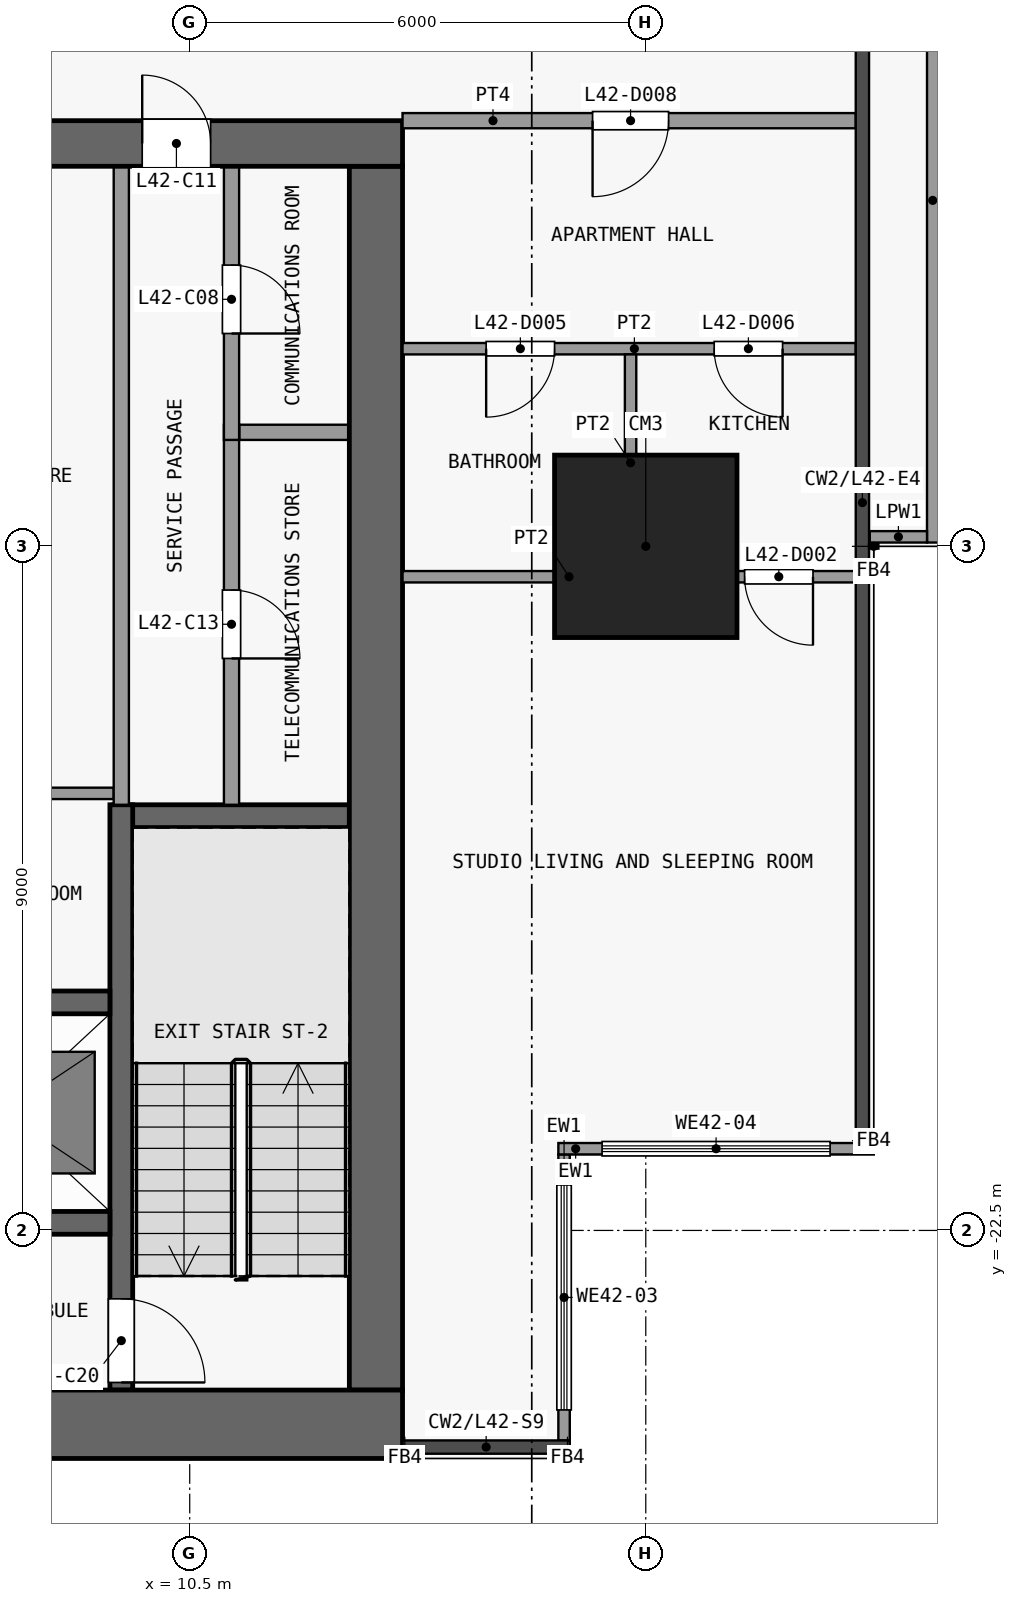
"""IFC4 building model, lengths in metres.
Left out: names, types, materials, properties, quantities, classifications, styles, units other than length and angle.
Written with IfcOpenShell. Run it as: python <this file> out.ifc"""

import sys

from ifc_helpers import new_model, si_unit, direction, frame, frame_2d, origin, origin_2d, place, context, subcontext, project, spatial, rectangle, extrude, element, fill, save


model = new_model("IFC4")
c1 = context("Model", 3, precision=1e-05, world=origin(), true_north=direction((0.0, 1.0)))
c2 = subcontext(c1, "Body", "Model", "MODEL_VIEW")
j1 = project(units=[si_unit("LENGTHUNIT", "METRE"), si_unit("PLANEANGLEUNIT", "RADIAN")], contexts=[c1])
p1 = place(None, origin())
s1 = spatial("IfcSite", under=j1, at=p1, CompositionType="ELEMENT")
p2 = place(p1, origin())
s2 = spatial("IfcBuilding", under=s1, at=p2, CompositionType="ELEMENT")
p3 = place(p2, frame((0.0, 0.0, 170.9)))
s3 = spatial("IfcBuildingStorey", under=s2, at=p3, CompositionType="ELEMENT", Elevation=170.9)
p4 = place(p3, frame((16.5, -13.5, 0.0), z_axis=(0.0, 0.0, 1.0), x_axis=(1.0, 0.0, 0.0)))
e1 = element("IfcColumn", 1, at=p4, inside=s3, PredefinedType="COLUMN", context=c2, shape_type="SweptSolid", body=[
    extrude(rectangle(XDim=2.4, YDim=2.4, at=origin_2d()), origin(), (0.0, 0.0, 1.0), 3.6),
])
p5 = place(p3, frame((-13.3, -25.05, 0.0), z_axis=(0.0, 0.0, 1.0), x_axis=(1.0, 0.0, 0.0)))
e2 = element("IfcWall", 2, at=p5, inside=s3, PredefinedType="SHEAR", context=c2, shape_type="SweptSolid", body=[
    extrude(rectangle(XDim=26.6, YDim=0.9, at=frame_2d((13.3, 0.0))), origin(), (0.0, 0.0, 1.0), 3.3),
])
p6 = place(p3, frame((-13.3, -8.2, 0.0), z_axis=(0.0, 0.0, 1.0), x_axis=(1.0, 0.0, 0.0)))
e3 = element("IfcWall", 3, at=p6, inside=s3, PredefinedType="SHEAR", context=c2, shape_type="SweptSolid", body=[
    extrude(rectangle(XDim=26.6, YDim=0.6, at=frame_2d((13.3, 0.0))), origin(), (0.0, 0.0, 1.0), 3.3),
])
p7 = place(p6, frame((7.6, 0.0, 0.0)))
e4 = element("IfcOpeningElement", 4, at=p7, cuts=e3, PredefinedType="OPENING", context=c2, shape_type="SweptSolid", body=[
    extrude(rectangle(XDim=1.8, YDim=2.1, at=frame_2d((0.9, 1.05))), frame((0.0, 0.31, 0.0), z_axis=(0.0, -1.0, 0.0), x_axis=(1.0, 0.0, 0.0)), (0.0, 0.0, 1.0), 0.62),
])
p8 = place(p6, frame((17.2, 0.0, 0.0)))
e5 = element("IfcOpeningElement", 5, at=p8, cuts=e3, PredefinedType="OPENING", context=c2, shape_type="SweptSolid", body=[
    extrude(rectangle(XDim=1.8, YDim=2.1, at=frame_2d((0.9, 1.05))), frame((0.0, 0.31, 0.0), z_axis=(0.0, -1.0, 0.0), x_axis=(1.0, 0.0, 0.0)), (0.0, 0.0, 1.0), 0.62),
])
p9 = place(p6, frame((2.525, 0.0, 0.0)))
e6 = element("IfcOpeningElement", 6, at=p9, cuts=e3, PredefinedType="OPENING", context=c2, shape_type="SweptSolid", body=[
    extrude(rectangle(XDim=0.9, YDim=2.1, at=frame_2d((0.45, 1.05))), frame((0.0, 0.31, 0.0), z_axis=(0.0, -1.0, 0.0), x_axis=(1.0, 0.0, 0.0)), (0.0, 0.0, 1.0), 0.62),
])
p10 = place(p6, frame((23.175, 0.0, 0.0)))
e7 = element("IfcOpeningElement", 7, at=p10, cuts=e3, PredefinedType="OPENING", context=c2, shape_type="SweptSolid", body=[
    extrude(rectangle(XDim=0.9, YDim=2.1, at=frame_2d((0.45, 1.05))), frame((0.0, 0.31, 0.0), z_axis=(0.0, -1.0, 0.0), x_axis=(1.0, 0.0, 0.0)), (0.0, 0.0, 1.0), 0.62),
])
p11 = place(p3, frame((12.95, -24.6, 0.0), z_axis=(0.0, 0.0, 1.0), x_axis=(0.0, 1.0, 0.0)))
e8 = element("IfcWall", 8, at=p11, inside=s3, PredefinedType="SHEAR", context=c2, shape_type="SweptSolid", body=[
    extrude(rectangle(XDim=16.1, YDim=0.7, at=frame_2d((8.05, 0.0))), origin(), (0.0, 0.0, 1.0), 3.3),
])
p12 = place(p3, frame((6.35, -22.4, 0.0), z_axis=(0.0, 0.0, 1.0), x_axis=(1.0, 0.0, 0.0)))
e9 = element("IfcWall", 9, at=p12, inside=s3, PredefinedType="SHEAR", context=c2, shape_type="SweptSolid", body=[
    extrude(rectangle(XDim=3.1, YDim=0.3, at=frame_2d((1.55, 0.0))), origin(), (0.0, 0.0, 1.0), 3.3),
])
p13 = place(p3, frame((6.425, -19.5, 0.0), z_axis=(0.0, 0.0, 1.0), x_axis=(1.0, 0.0, 0.0)))
e10 = element("IfcWall", 10, at=p13, inside=s3, PredefinedType="SHEAR", context=c2, shape_type="SweptSolid", body=[
    extrude(rectangle(XDim=3.025, YDim=0.3, at=frame_2d((1.512, 0.0))), origin(), (0.0, 0.0, 1.0), 3.3),
])
p14 = place(p3, frame((9.5, -17.05, 0.0), z_axis=(0.0, 0.0, 1.0), x_axis=(1.0, 0.0, 0.0)))
e11 = element("IfcWall", 11, at=p14, inside=s3, PredefinedType="SHEAR", context=c2, shape_type="SweptSolid", body=[
    extrude(rectangle(XDim=3.1, YDim=0.3, at=frame_2d((1.55, 0.0))), origin(), (0.0, 0.0, 1.0), 3.3),
])
p15 = place(p3, frame((6.575, -16.75, 0.0), z_axis=(0.0, 0.0, 1.0), x_axis=(1.0, 0.0, 0.0)))
e12 = element("IfcWall", 12, at=p15, inside=s3, PredefinedType="PARTITIONING", context=c2, shape_type="SweptSolid", body=[
    extrude(rectangle(XDim=2.925, YDim=0.15, at=frame_2d((1.462, 0.0))), origin(), (0.0, 0.0, 1.0), 3.3),
])
p16 = place(p3, frame((11.15, -12.0, 0.0), z_axis=(0.0, 0.0, 1.0), x_axis=(1.0, 0.0, 0.0)))
e13 = element("IfcWall", 13, at=p16, inside=s3, PredefinedType="PARTITIONING", context=c2, shape_type="SweptSolid", body=[
    extrude(rectangle(XDim=1.45, YDim=0.2, at=frame_2d((0.725, 0.0))), origin(), (0.0, 0.0, 1.0), 3.3),
])
p17 = place(p3, frame((9.6, -16.9, 0.0), z_axis=(0.0, 0.0, 1.0), x_axis=(0.0, -1.0, 0.0)))
e14 = element("IfcWall", 14, at=p17, inside=s3, PredefinedType="SHEAR", context=c2, shape_type="SweptSolid", body=[
    extrude(rectangle(XDim=7.7, YDim=0.3, at=frame_2d((3.85, 0.0))), origin(), (0.0, 0.0, 1.0), 3.3),
])
p18 = place(p17, frame((6.5, 0.0, 0.0)))
e15 = element("IfcOpeningElement", 15, at=p18, cuts=e14, PredefinedType="OPENING", context=c2, shape_type="SweptSolid", body=[
    extrude(rectangle(XDim=1.1, YDim=2.1, at=frame_2d((0.55, 1.05))), frame((0.0, 0.16, 0.0), z_axis=(0.0, -1.0, 0.0), x_axis=(1.0, 0.0, 0.0)), (0.0, 0.0, 1.0), 0.32),
])
p19 = place(p3, frame((9.6, -16.9, 0.0), z_axis=(0.0, 0.0, 1.0), x_axis=(0.0, 1.0, 0.0)))
e16 = element("IfcWall", 16, at=p19, inside=s3, PredefinedType="PARTITIONING", context=c2, shape_type="SweptSolid", body=[
    extrude(rectangle(XDim=8.4, YDim=0.2, at=frame_2d((4.2, 0.0))), origin(), (0.0, 0.0, 1.0), 3.3),
])
p20 = place(p3, frame((11.05, -11.9, 0.0), z_axis=(0.0, 0.0, 1.0), x_axis=(0.0, -1.0, 0.0)))
e17 = element("IfcWall", 17, at=p20, inside=s3, PredefinedType="PARTITIONING", context=c2, shape_type="SweptSolid", body=[
    extrude(rectangle(XDim=5.0, YDim=0.2, at=frame_2d((2.5, 0.0))), origin(), (0.0, 0.0, 1.0), 3.3),
])
p21 = place(p20, frame((2.175, 0.0, 0.0)))
e18 = element("IfcOpeningElement", 18, at=p21, cuts=e17, PredefinedType="OPENING", context=c2, shape_type="SweptSolid", body=[
    extrude(rectangle(XDim=0.9, YDim=2.1, at=frame_2d((0.45, 1.05))), frame((0.0, 0.11, 0.0), z_axis=(0.0, -1.0, 0.0), x_axis=(1.0, 0.0, 0.0)), (0.0, 0.0, 1.0), 0.22),
])
p22 = place(p3, frame((11.05, -8.5, 0.0), z_axis=(0.0, 0.0, 1.0), x_axis=(0.0, -1.0, 0.0)))
e19 = element("IfcWall", 19, at=p22, inside=s3, PredefinedType="PARTITIONING", context=c2, shape_type="SweptSolid", body=[
    extrude(rectangle(XDim=3.6, YDim=0.2, at=frame_2d((1.8, 0.0))), origin(), (0.0, 0.0, 1.0), 3.3),
])
p23 = place(p22, frame((1.3, 0.0, 0.0)))
e20 = element("IfcOpeningElement", 20, at=p23, cuts=e19, PredefinedType="OPENING", context=c2, shape_type="SweptSolid", body=[
    extrude(rectangle(XDim=0.9, YDim=2.1, at=frame_2d((0.45, 1.05))), frame((0.0, 0.11, 0.0), z_axis=(0.0, -1.0, 0.0), x_axis=(1.0, 0.0, 0.0)), (0.0, 0.0, 1.0), 0.22),
])
p24 = place(p3, frame((15.425, -21.5, 0.0), z_axis=(0.0, 0.0, 1.0), x_axis=(0.0, -1.0, 0.0)))
e21 = element("IfcWall", 21, at=p24, inside=s3, PredefinedType="SOLIDWALL", context=c2, shape_type="SweptSolid", body=[
    extrude(rectangle(XDim=3.762, YDim=0.15, at=frame_2d((1.881, 0.0))), origin(), (0.0, 0.0, 1.0), 3.3),
])
p25 = place(p24, frame((0.401, 0.0, 0.9)))
e22 = element("IfcOpeningElement", 22, at=p25, cuts=e21, PredefinedType="OPENING", context=c2, shape_type="SweptSolid", body=[
    extrude(rectangle(XDim=2.96, YDim=2.4, at=frame_2d((1.48, 1.2))), frame((0.0, 0.085, 0.0), z_axis=(0.0, -1.0, 0.0), x_axis=(1.0, 0.0, 0.0)), (0.0, 0.0, 1.0), 0.17),
])
p26 = place(p3, frame((19.5, -21.425, 0.0), z_axis=(0.0, 0.0, 1.0), x_axis=(-1.0, 0.0, 0.0)))
e23 = element("IfcWall", 23, at=p26, inside=s3, PredefinedType="SOLIDWALL", context=c2, shape_type="SweptSolid", body=[
    extrude(rectangle(XDim=4.15, YDim=0.15, at=frame_2d((2.075, 0.0))), origin(), (0.0, 0.0, 1.0), 3.3),
])
p27 = place(p26, frame((0.575, 0.0, 0.9)))
e24 = element("IfcOpeningElement", 24, at=p27, cuts=e23, PredefinedType="OPENING", context=c2, shape_type="SweptSolid", body=[
    extrude(rectangle(XDim=3.0, YDim=2.4, at=frame_2d((1.5, 1.2))), frame((0.0, 0.085, 0.0), z_axis=(0.0, -1.0, 0.0), x_axis=(1.0, 0.0, 0.0)), (0.0, 0.0, 1.0), 0.17),
])
p28 = place(p3, frame((20.275, -4.448, 0.0), z_axis=(0.0, 0.0, 1.0), x_axis=(0.0, -1.0, 0.0)))
e25 = element("IfcWall", 25, at=p28, inside=s3, PredefinedType="PARAPET", context=c2, shape_type="SweptSolid", body=[
    extrude(rectangle(XDim=9.002, YDim=0.15, at=frame_2d((4.501, 0.0))), origin(), (0.0, 0.0, 1.0), 1.15),
])
p29 = place(p3, frame((20.2, -13.375, 0.0), z_axis=(0.0, 0.0, 1.0), x_axis=(-1.0, 0.0, 0.0)))
e26 = element("IfcWall", 26, at=p29, inside=s3, PredefinedType="PARAPET", context=c2, shape_type="SweptSolid", body=[
    extrude(rectangle(XDim=0.752, YDim=0.15, at=frame_2d((0.376, 0.0))), origin(), (0.0, 0.0, 1.0), 1.15),
])
p30 = place(p3, frame((13.3, -13.9, 0.0), z_axis=(0.0, 0.0, 1.0), x_axis=(1.0, 0.0, 0.0)))
e27 = element("IfcWall", 27, at=p30, inside=s3, PredefinedType="PARTITIONING", context=c2, shape_type="SweptSolid", body=[
    extrude(rectangle(XDim=5.962, YDim=0.15, at=frame_2d((2.981, 0.0))), origin(), (0.0, 0.0, 1.0), 3.3),
])
p31 = place(p30, frame((4.5, 0.0, 0.0)))
e28 = element("IfcOpeningElement", 28, at=p31, cuts=e27, PredefinedType="OPENING", context=c2, shape_type="SweptSolid", body=[
    extrude(rectangle(XDim=0.9, YDim=2.1, at=frame_2d((0.45, 1.05))), frame((0.0, 0.085, 0.0), z_axis=(0.0, -1.0, 0.0), x_axis=(1.0, 0.0, 0.0)), (0.0, 0.0, 1.0), 0.17),
])
p32 = place(p3, frame((13.3, -10.9, 0.0), z_axis=(0.0, 0.0, 1.0), x_axis=(1.0, 0.0, 0.0)))
e29 = element("IfcWall", 29, at=p32, inside=s3, PredefinedType="PARTITIONING", context=c2, shape_type="SweptSolid", body=[
    extrude(rectangle(XDim=5.962, YDim=0.15, at=frame_2d((2.981, 0.0))), origin(), (0.0, 0.0, 1.0), 3.3),
])
p33 = place(p32, frame((1.1, 0.0, 0.0)))
e30 = element("IfcOpeningElement", 30, at=p33, cuts=e29, PredefinedType="OPENING", context=c2, shape_type="SweptSolid", body=[
    extrude(rectangle(XDim=0.9, YDim=2.1, at=frame_2d((0.45, 1.05))), frame((0.0, 0.085, 0.0), z_axis=(0.0, -1.0, 0.0), x_axis=(1.0, 0.0, 0.0)), (0.0, 0.0, 1.0), 0.17),
])
p34 = place(p32, frame((4.1, 0.0, 0.0)))
e31 = element("IfcOpeningElement", 31, at=p34, cuts=e29, PredefinedType="OPENING", context=c2, shape_type="SweptSolid", body=[
    extrude(rectangle(XDim=0.9, YDim=2.1, at=frame_2d((0.45, 1.05))), frame((0.0, 0.085, 0.0), z_axis=(0.0, -1.0, 0.0), x_axis=(1.0, 0.0, 0.0)), (0.0, 0.0, 1.0), 0.17),
])
p35 = place(p3, frame((13.3, -7.9, 0.0), z_axis=(0.0, 0.0, 1.0), x_axis=(1.0, 0.0, 0.0)))
e32 = element("IfcWall", 32, at=p35, inside=s3, PredefinedType="PARTITIONING", context=c2, shape_type="SweptSolid", body=[
    extrude(rectangle(XDim=5.962, YDim=0.2, at=frame_2d((2.981, 0.0))), origin(), (0.0, 0.0, 1.0), 3.3),
])
p36 = place(p35, frame((2.5, 0.0, 0.0)))
e33 = element("IfcOpeningElement", 33, at=p36, cuts=e32, PredefinedType="OPENING", context=c2, shape_type="SweptSolid", body=[
    extrude(rectangle(XDim=1.0, YDim=2.1, at=frame_2d((0.5, 1.05))), frame((0.0, 0.11, 0.0), z_axis=(0.0, -1.0, 0.0), x_axis=(1.0, 0.0, 0.0)), (0.0, 0.0, 1.0), 0.22),
])
p37 = place(p3, frame((16.3, -13.825, 0.0), z_axis=(0.0, 0.0, 1.0), x_axis=(0.0, 1.0, 0.0)))
e34 = element("IfcWall", 34, at=p37, inside=s3, PredefinedType="PARTITIONING", context=c2, shape_type="SweptSolid", body=[
    extrude(rectangle(XDim=2.85, YDim=0.15, at=frame_2d((1.425, 0.0))), origin(), (0.0, 0.0, 1.0), 3.3),
])
p38 = place(p23, origin())
e35 = element("IfcDoor", 35, at=p38, inside=s3, OperationType="SINGLE_SWING_RIGHT", PredefinedType="DOOR", context=c2, shape_type="SweptSolid", body=[
    extrude(rectangle(XDim=0.9, YDim=2.1, at=frame_2d((0.45, 1.05))), frame((0.0, 0.025, 0.0), z_axis=(0.0, -1.0, 0.0), x_axis=(1.0, 0.0, 0.0)), (0.0, 0.0, 1.0), 0.05),
])
fill(e20, e35)
p39 = place(p10, origin())
e36 = element("IfcDoor", 36, at=p39, inside=s3, OperationType="SINGLE_SWING_LEFT", PredefinedType="DOOR", context=c2, shape_type="SweptSolid", body=[
    extrude(rectangle(XDim=0.9, YDim=2.1, at=frame_2d((0.45, 1.05))), frame((0.0, 0.025, 0.0), z_axis=(0.0, -1.0, 0.0), x_axis=(1.0, 0.0, 0.0)), (0.0, 0.0, 1.0), 0.05),
])
fill(e7, e36)
p40 = place(p21, origin())
e37 = element("IfcDoor", 37, at=p40, inside=s3, OperationType="SINGLE_SWING_RIGHT", PredefinedType="DOOR", context=c2, shape_type="SweptSolid", body=[
    extrude(rectangle(XDim=0.9, YDim=2.1, at=frame_2d((0.45, 1.05))), frame((0.0, 0.025, 0.0), z_axis=(0.0, -1.0, 0.0), x_axis=(1.0, 0.0, 0.0)), (0.0, 0.0, 1.0), 0.05),
])
fill(e18, e37)
p41 = place(p18, origin())
e38 = element("IfcDoor", 38, at=p41, inside=s3, OperationType="SINGLE_SWING_RIGHT", PredefinedType="DOOR", context=c2, shape_type="SweptSolid", body=[
    extrude(rectangle(XDim=1.1, YDim=2.1, at=frame_2d((0.55, 1.05))), frame((0.0, 0.025, 0.0), z_axis=(0.0, -1.0, 0.0), x_axis=(1.0, 0.0, 0.0)), (0.0, 0.0, 1.0), 0.05),
])
fill(e15, e38)
p42 = place(p25, origin())
e39 = element("IfcWindow", 39, at=p42, inside=s3, PartitioningType="SINGLE_PANEL", PredefinedType="WINDOW", context=c2, shape_type="SweptSolid", body=[
    extrude(rectangle(XDim=2.96, YDim=2.4, at=frame_2d((1.48, 1.2))), frame((0.0, 0.03, 0.0), z_axis=(0.0, -1.0, 0.0), x_axis=(1.0, 0.0, 0.0)), (0.0, 0.0, 1.0), 0.06),
])
fill(e22, e39)
p43 = place(p27, origin())
e40 = element("IfcWindow", 40, at=p43, inside=s3, PartitioningType="SINGLE_PANEL", PredefinedType="WINDOW", context=c2, shape_type="SweptSolid", body=[
    extrude(rectangle(XDim=3.0, YDim=2.4, at=frame_2d((1.5, 1.2))), frame((0.0, 0.03, 0.0), z_axis=(0.0, -1.0, 0.0), x_axis=(1.0, 0.0, 0.0)), (0.0, 0.0, 1.0), 0.06),
])
fill(e24, e40)
p44 = place(p31, origin())
e41 = element("IfcDoor", 41, at=p44, inside=s3, OperationType="SINGLE_SWING_RIGHT", PredefinedType="DOOR", context=c2, shape_type="SweptSolid", body=[
    extrude(rectangle(XDim=0.9, YDim=2.1, at=frame_2d((0.45, 1.05))), frame((0.0, 0.025, 0.0), z_axis=(0.0, -1.0, 0.0), x_axis=(1.0, 0.0, 0.0)), (0.0, 0.0, 1.0), 0.05),
])
fill(e28, e41)
p45 = place(p33, origin())
e42 = element("IfcDoor", 42, at=p45, inside=s3, OperationType="SINGLE_SWING_LEFT", PredefinedType="DOOR", context=c2, shape_type="SweptSolid", body=[
    extrude(rectangle(XDim=0.9, YDim=2.1, at=frame_2d((0.45, 1.05))), frame((0.0, 0.025, 0.0), z_axis=(0.0, -1.0, 0.0), x_axis=(1.0, 0.0, 0.0)), (0.0, 0.0, 1.0), 0.05),
])
fill(e30, e42)
p46 = place(p34, origin())
e43 = element("IfcDoor", 43, at=p46, inside=s3, OperationType="SINGLE_SWING_RIGHT", PredefinedType="DOOR", context=c2, shape_type="SweptSolid", body=[
    extrude(rectangle(XDim=0.9, YDim=2.1, at=frame_2d((0.45, 1.05))), frame((0.0, 0.025, 0.0), z_axis=(0.0, -1.0, 0.0), x_axis=(1.0, 0.0, 0.0)), (0.0, 0.0, 1.0), 0.05),
])
fill(e31, e43)
p47 = place(p36, origin())
e44 = element("IfcDoor", 44, at=p47, inside=s3, OperationType="SINGLE_SWING_LEFT", PredefinedType="DOOR", context=c2, shape_type="SweptSolid", body=[
    extrude(rectangle(XDim=1.0, YDim=2.1, at=frame_2d((0.5, 1.05))), frame((0.0, 0.025, 0.0), z_axis=(0.0, -1.0, 0.0), x_axis=(1.0, 0.0, 0.0)), (0.0, 0.0, 1.0), 0.05),
])
fill(e33, e44)
save(model, sys.argv[1])
